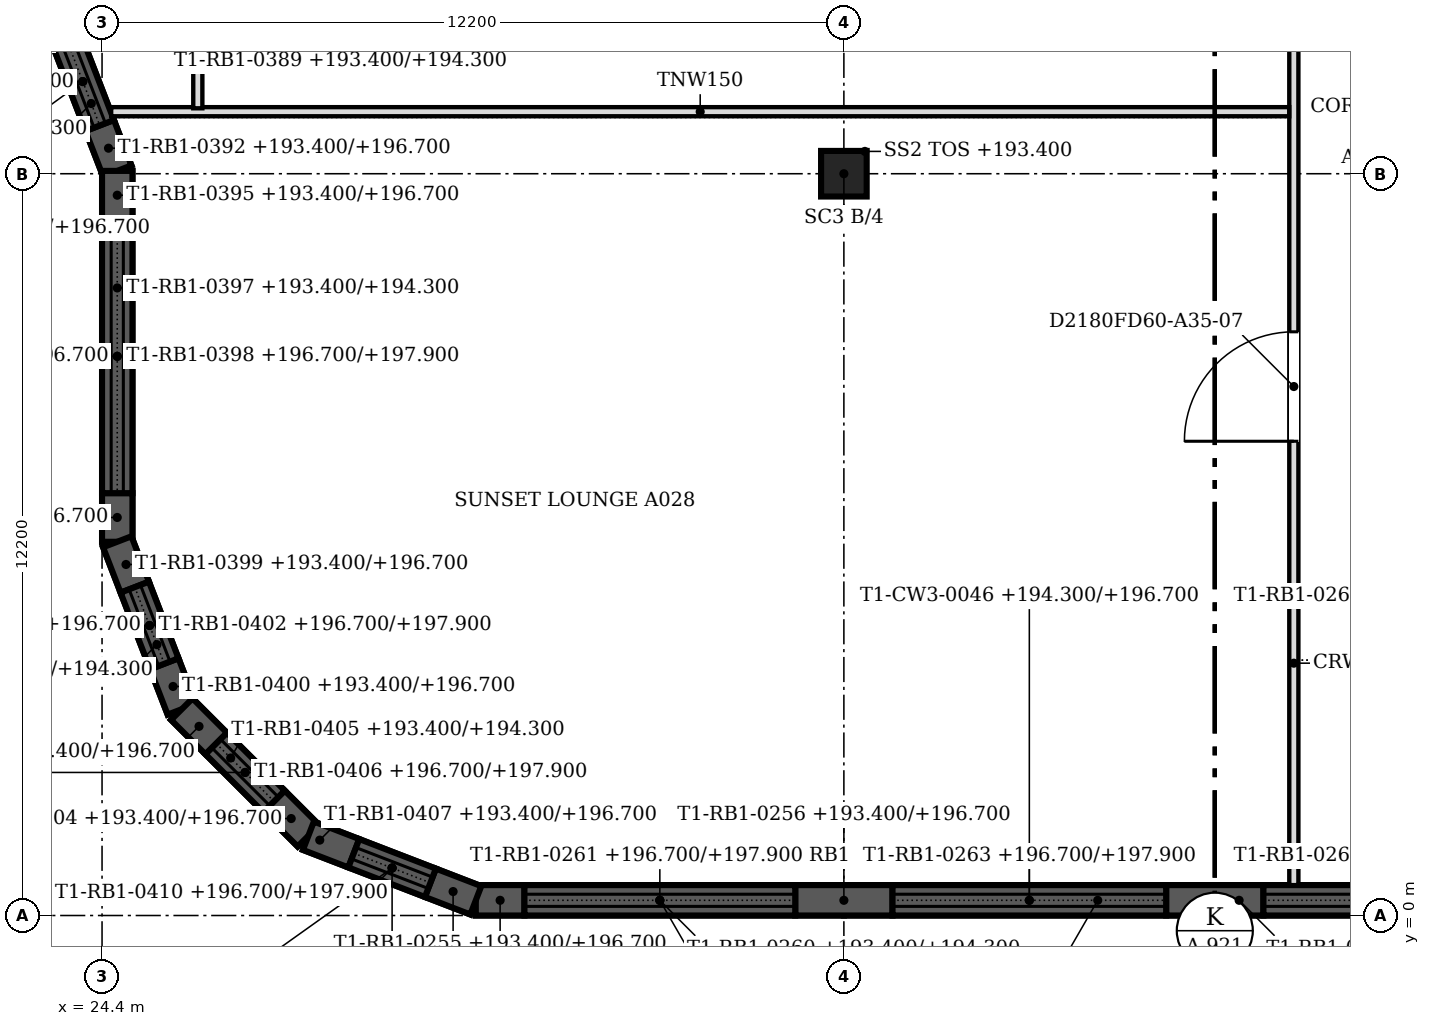
"""IFC4 building model, lengths in metres.
Left out: names, types, materials, properties, quantities, classifications, styles, units other than length and angle.
Written with IfcOpenShell. Run it as: python <this file> out.ifc"""

import sys

from ifc_helpers import new_model, si_unit, direction, frame, frame_2d, origin, origin_2d, place, context, subcontext, project, spatial, polyline, rectangle, outline, extrude, faceted_brep, source, transform, mapped, element, fill, save


model = new_model("IFC4")
c1 = context("Model", 3, precision=1e-05, world=origin(), true_north=direction((0.0, 1.0)))
c2 = subcontext(c1, "Body", "Model", "MODEL_VIEW")
j1 = project(units=[si_unit("LENGTHUNIT", "METRE"), si_unit("PLANEANGLEUNIT", "RADIAN")], contexts=[c1])
p1 = place(None, origin())
s1 = spatial("IfcSite", under=j1, at=p1, CompositionType="ELEMENT")
p2 = place(p1, origin())
s2 = spatial("IfcBuilding", under=s1, at=p2, CompositionType="ELEMENT")
p3 = place(p2, frame((0.0, 0.0, 193.4)))
s3 = spatial("IfcBuildingStorey", under=s2, at=p3, CompositionType="ELEMENT", Elevation=193.4)
p4 = place(p3, frame((36.6, 12.2, 0.0), z_axis=(0.0, 0.0, 1.0), x_axis=(1.0, 0.0, 0.0)))
e1 = element("IfcColumn", 1, at=p4, inside=s3, PredefinedType="COLUMN", context=c2, shape_type="SweptSolid", body=[
    extrude(rectangle(XDim=0.75, YDim=0.75, at=origin_2d()), origin(), (0.0, 0.0, 1.0), 4.3),
])
m1 = source(origin(), c2, "Body", "Brep", [
    faceted_brep([(0.0, -0.25, 0.0), (0.8, -0.25, 0.0), (0.8, -0.25, 3.3), (0.0, -0.25, 3.3), (0.047, 0.25, 3.3), (0.8, 0.25, 3.3), (0.8, 0.25, 0.0), (0.047, 0.25, 0.0), (0.0, 0.0, 0.0), (0.0, 0.0, 3.3)], [[[0, 1, 2, 3]], [[4, 5, 6, 7]], [[7, 6, 1, 0, 8]], [[5, 4, 9, 3, 2]], [[8, 0, 3, 9]], [[7, 8, 9, 4]], [[1, 6, 5, 2]]]),
])
p5 = place(p3, frame((30.547, 0.25, 0.0), z_axis=(0.0, 0.0, 1.0), x_axis=(1.0, 0.0, 0.0)))
e2 = element("IfcWall", 2, at=p5, inside=s3, PredefinedType="SOLIDWALL", context=c2, shape_type="MappedRepresentation", body=[
    mapped(m1, transform((0.0, 0.0, 0.0), scale=1.0)),
])
m2 = source(origin(), c2, "Body", "Brep", [
    faceted_brep([(0.0, -0.25, 0.0), (1.6, -0.25, 0.0), (1.6, -0.25, 3.3), (0.0, -0.25, 3.3), (0.0, 0.25, 3.3), (1.6, 0.25, 3.3), (1.6, 0.25, 0.0), (0.0, 0.25, 0.0)], [[[0, 1, 2, 3]], [[4, 5, 6, 7]], [[7, 6, 1, 0]], [[5, 4, 3, 2]], [[4, 7, 0, 3]], [[1, 6, 5, 2]]]),
])
p6 = place(p3, frame((35.8, 0.25, 0.0), z_axis=(0.0, 0.0, 1.0), x_axis=(1.0, 0.0, 0.0)))
e3 = element("IfcWall", 3, at=p6, inside=s3, PredefinedType="SOLIDWALL", context=c2, shape_type="MappedRepresentation", body=[
    mapped(m2, transform((0.0, 0.0, 0.0), scale=1.0)),
])
m3 = source(origin(), c2, "Body", "SweptSolid", [
    extrude(outline(polyline([(0.0, 0.0), (1.6, 0.0), (1.6, 3.3), (0.0, 3.3), (0.0, 0.0)])), frame((0.0, 0.25, 0.0), z_axis=(0.0, -1.0, 0.0), x_axis=(1.0, 0.0, 0.0)), (0.0, 0.0, 1.0), 0.5),
])
p7 = place(p3, frame((41.9, 0.25, 0.0), z_axis=(0.0, 0.0, 1.0), x_axis=(1.0, 0.0, 0.0)))
e4 = element("IfcWall", 4, at=p7, inside=s3, PredefinedType="SOLIDWALL", context=c2, shape_type="MappedRepresentation", body=[
    mapped(m3, transform((0.0, 0.0, 0.0), scale=1.0)),
])
m4 = source(origin(), c2, "Body", "SweptSolid", [
    extrude(outline(polyline([(0.0, 0.0), (4.453, 0.0), (4.453, 0.9), (0.0, 0.9), (0.0, 0.0)])), frame((0.0, 0.25, 0.0), z_axis=(0.0, -1.0, 0.0), x_axis=(1.0, 0.0, 0.0)), (0.0, 0.0, 1.0), 0.5),
])
p8 = place(p3, frame((31.346, 0.25, 0.0), z_axis=(0.0, 0.0, 1.0), x_axis=(1.0, 0.0, 0.0)))
e5 = element("IfcWall", 5, at=p8, inside=s3, PredefinedType="SOLIDWALL", context=c2, shape_type="MappedRepresentation", body=[
    mapped(m4, transform((0.0, 0.0, 0.0), scale=1.0)),
])
m5 = source(origin(), c2, "Body", "Brep", [
    faceted_brep([(0.0, -0.25, 0.0), (6.053, -0.25, 0.0), (6.053, -0.25, 1.2), (0.0, -0.25, 1.2), (0.047, 0.25, 1.2), (6.053, 0.25, 1.2), (6.053, 0.25, 0.0), (0.047, 0.25, 0.0), (0.0, 0.0, 0.0), (0.0, 0.0, 1.2)], [[[0, 1, 2, 3]], [[4, 5, 6, 7]], [[7, 6, 1, 0, 8]], [[5, 4, 9, 3, 2]], [[8, 0, 3, 9]], [[7, 8, 9, 4]], [[1, 6, 5, 2]]]),
])
p9 = place(p3, frame((30.547, 0.25, 3.3), z_axis=(0.0, 0.0, 1.0), x_axis=(1.0, 0.0, 0.0)))
e6 = element("IfcWall", 6, at=p9, inside=s3, PredefinedType="SOLIDWALL", context=c2, shape_type="MappedRepresentation", body=[
    mapped(m5, transform((0.0, 0.0, 0.0), scale=1.0)),
])
m6 = source(origin(), c2, "Body", "SweptSolid", [
    extrude(outline(polyline([(0.0, 0.0), (4.5, 0.0), (4.5, 0.9), (0.0, 0.9), (0.0, 0.0)])), frame((0.0, 0.25, 0.0), z_axis=(0.0, -1.0, 0.0), x_axis=(1.0, 0.0, 0.0)), (0.0, 0.0, 1.0), 0.5),
])
p10 = place(p3, frame((37.4, 0.25, 0.0), z_axis=(0.0, 0.0, 1.0), x_axis=(1.0, 0.0, 0.0)))
e7 = element("IfcWall", 7, at=p10, inside=s3, PredefinedType="SOLIDWALL", context=c2, shape_type="MappedRepresentation", body=[
    mapped(m6, transform((0.0, 0.0, 0.0), scale=1.0)),
])
m7 = source(origin(), c2, "Body", "Brep", [
    faceted_brep([(0.0, -0.25, 0.0), (6.1, -0.25, 0.0), (6.1, -0.25, 1.2), (0.0, -0.25, 1.2), (0.0, 0.25, 1.2), (6.1, 0.25, 1.2), (6.1, 0.25, 0.0), (0.0, 0.25, 0.0)], [[[0, 1, 2, 3]], [[4, 5, 6, 7]], [[7, 6, 1, 0]], [[5, 4, 3, 2]], [[4, 7, 0, 3]], [[1, 6, 5, 2]]]),
])
p11 = place(p3, frame((36.6, 0.25, 3.3), z_axis=(0.0, 0.0, 1.0), x_axis=(1.0, 0.0, 0.0)))
e8 = element("IfcWall", 8, at=p11, inside=s3, PredefinedType="SOLIDWALL", context=c2, shape_type="MappedRepresentation", body=[
    mapped(m7, transform((0.0, 0.0, 0.0), scale=1.0)),
])
p12 = place(p3, frame((43.5, 0.25, 0.0), z_axis=(0.0, 0.0, 1.0), x_axis=(1.0, 0.0, 0.0)))
e9 = element("IfcWall", 9, at=p12, inside=s3, PredefinedType="SOLIDWALL", context=c2, shape_type="MappedRepresentation", body=[
    mapped(m6, transform((0.0, 0.0, 0.0), scale=1.0)),
])
m8 = source(origin(), c2, "Body", "SweptSolid", [
    extrude(outline(polyline([(0.0, 0.0), (6.1, 0.0), (6.1, 1.2), (0.0, 1.2), (0.0, 0.0)])), frame((0.0, 0.25, 0.0), z_axis=(0.0, -1.0, 0.0), x_axis=(1.0, 0.0, 0.0)), (0.0, 0.0, 1.0), 0.5),
])
p13 = place(p3, frame((42.7, 0.25, 3.3), z_axis=(0.0, 0.0, 1.0), x_axis=(1.0, 0.0, 0.0)))
e10 = element("IfcWall", 10, at=p13, inside=s3, PredefinedType="SOLIDWALL", context=c2, shape_type="MappedRepresentation", body=[
    mapped(m8, transform((0.0, 0.0, 0.0), scale=1.0)),
])
m9 = source(origin(), c2, "Body", "Brep", [
    faceted_brep([(0.0, -0.25, 0.0), (0.753, -0.25, 0.0), (0.753, -0.25, 3.3), (0.0, -0.25, 3.3), (0.0, 0.25, 3.3), (0.8, 0.25, 3.3), (0.8, 0.25, 0.0), (0.0, 0.25, 0.0), (0.8, 0.0, 0.0), (0.8, 0.0, 3.3)], [[[0, 1, 2, 3]], [[4, 5, 6, 7]], [[7, 6, 8, 1, 0]], [[6, 5, 9, 8]], [[5, 4, 3, 2, 9]], [[4, 7, 0, 3]], [[1, 8, 9, 2]]]),
])
p14 = place(p3, frame((24.362, 12.993, 0.0), z_axis=(0.0, 0.0, 1.0), x_axis=(0.3598379092, -0.93301483327, 0.0)))
e11 = element("IfcWall", 11, at=p14, inside=s3, PredefinedType="SOLIDWALL", context=c2, shape_type="MappedRepresentation", body=[
    mapped(m9, transform((0.0, 0.0, 0.0), scale=1.0)),
])
m10 = source(origin(), c2, "Body", "Brep", [
    faceted_brep([(0.0, -0.25, 0.0), (1.549, -0.25, 0.0), (1.549, -0.25, 0.9), (0.0, -0.25, 0.9), (0.0, 0.25, 0.9), (1.549, 0.25, 0.9), (1.549, 0.25, 0.0), (0.0, 0.25, 0.0)], [[[0, 1, 2, 3]], [[4, 5, 6, 7]], [[7, 6, 1, 0]], [[5, 4, 3, 2]], [[4, 7, 0, 3]], [[1, 6, 5, 2]]]),
])
p15 = place(p3, frame((23.804, 14.438, 0.0), z_axis=(0.0, 0.0, 1.0), x_axis=(0.359897541845, -0.932991832426, 0.0)))
e12 = element("IfcWall", 12, at=p15, inside=s3, PredefinedType="SOLIDWALL", context=c2, shape_type="MappedRepresentation", body=[
    mapped(m10, transform((0.0, 0.0, 0.0), scale=1.0)),
])
m11 = source(origin(), c2, "Body", "Brep", [
    faceted_brep([(0.053, -0.25, 0.0), (3.103, -0.25, 0.0), (3.103, -0.25, 1.2), (0.053, -0.25, 1.2), (0.0, 0.25, 1.2), (3.149, 0.25, 1.2), (3.149, 0.25, 0.0), (0.0, 0.25, 0.0), (3.149, -0.0, 0.0), (0.0, 0.0, 0.0), (3.149, -0.0, 1.2), (0.0, 0.0, 1.2)], [[[0, 1, 2, 3]], [[4, 5, 6, 7]], [[7, 6, 8, 1, 0, 9]], [[6, 5, 10, 8]], [[5, 4, 11, 3, 2, 10]], [[4, 7, 9, 11]], [[9, 0, 3, 11]], [[1, 8, 10, 2]]]),
])
p16 = place(p3, frame((23.517, 15.185, 3.3), z_axis=(0.0, 0.0, 1.0), x_axis=(0.359841220347, -0.933013556246, 0.0)))
e13 = element("IfcWall", 13, at=p16, inside=s3, PredefinedType="SOLIDWALL", context=c2, shape_type="MappedRepresentation", body=[
    mapped(m11, transform((0.0, 0.0, 0.0), scale=1.0)),
])
m12 = source(origin(), c2, "Body", "Brep", [
    faceted_brep([(0.047, -0.25, 0.0), (0.8, -0.25, 0.0), (0.8, -0.25, 3.3), (0.047, -0.25, 3.3), (0.0, 0.25, 3.3), (0.8, 0.25, 3.3), (0.8, 0.25, 0.0), (0.0, 0.25, 0.0), (0.0, 0.0, 0.0), (0.0, 0.0, 3.3)], [[[0, 1, 2, 3]], [[4, 5, 6, 7]], [[7, 6, 1, 0, 8]], [[5, 4, 9, 3, 2]], [[4, 7, 8, 9]], [[8, 0, 3, 9]], [[1, 6, 5, 2]]]),
])
p17 = place(p3, frame((24.65, 12.247, 0.0), z_axis=(0.0, 0.0, 1.0), x_axis=(0.0, -1.0, 0.0)))
e14 = element("IfcWall", 14, at=p17, inside=s3, PredefinedType="SOLIDWALL", context=c2, shape_type="MappedRepresentation", body=[
    mapped(m12, transform((0.0, 0.0, 0.0), scale=1.0)),
])
m13 = source(origin(), c2, "Body", "Brep", [
    faceted_brep([(0.0, -0.25, 0.0), (0.8, -0.25, 0.0), (0.8, -0.25, 3.3), (0.0, -0.25, 3.3), (0.0, 0.25, 3.3), (0.753, 0.25, 3.3), (0.753, 0.25, 0.0), (0.0, 0.25, 0.0), (0.8, -0.0, 0.0), (0.8, -0.0, 3.3)], [[[0, 1, 2, 3]], [[4, 5, 6, 7]], [[7, 6, 8, 1, 0]], [[9, 2, 1, 8]], [[5, 4, 3, 2, 9]], [[4, 7, 0, 3]], [[8, 6, 5, 9]]]),
])
p18 = place(p3, frame((24.65, 6.947, 0.0), z_axis=(0.0, 0.0, 1.0), x_axis=(0.0, -1.0, 0.0)))
e15 = element("IfcWall", 15, at=p18, inside=s3, PredefinedType="SOLIDWALL", context=c2, shape_type="MappedRepresentation", body=[
    mapped(m13, transform((0.0, 0.0, 0.0), scale=1.0)),
])
p19 = place(p3, frame((24.65, 11.447, 0.0), z_axis=(0.0, 0.0, 1.0), x_axis=(0.0, -1.0, 0.0)))
e16 = element("IfcWall", 16, at=p19, inside=s3, PredefinedType="SOLIDWALL", context=c2, shape_type="MappedRepresentation", body=[
    mapped(m6, transform((0.0, 0.0, 0.0), scale=1.0)),
])
m14 = source(origin(), c2, "Body", "Brep", [
    faceted_brep([(0.047, -0.25, 0.0), (6.1, -0.25, 0.0), (6.1, -0.25, 1.2), (0.047, -0.25, 1.2), (0.0, 0.25, 1.2), (6.053, 0.25, 1.2), (6.053, 0.25, 0.0), (0.0, 0.25, 0.0), (6.1, -0.0, 0.0), (0.0, 0.0, 0.0), (6.1, -0.0, 1.2), (0.0, 0.0, 1.2)], [[[0, 1, 2, 3]], [[4, 5, 6, 7]], [[7, 6, 8, 1, 0, 9]], [[10, 2, 1, 8]], [[5, 4, 11, 3, 2, 10]], [[4, 7, 9, 11]], [[9, 0, 3, 11]], [[8, 6, 5, 10]]]),
])
p20 = place(p3, frame((24.65, 12.247, 3.3), z_axis=(0.0, 0.0, 1.0), x_axis=(0.0, -1.0, 0.0)))
e17 = element("IfcWall", 17, at=p20, inside=s3, PredefinedType="SOLIDWALL", context=c2, shape_type="MappedRepresentation", body=[
    mapped(m14, transform((0.0, 0.0, 0.0), scale=1.0)),
])
p21 = place(p3, frame((24.65, 6.146, 0.0), z_axis=(0.0, 0.0, 1.0), x_axis=(0.360103552367, -0.932912338632, 0.0)))
e18 = element("IfcWall", 18, at=p21, inside=s3, PredefinedType="SOLIDWALL", context=c2, shape_type="MappedRepresentation", body=[
    mapped(m1, transform((0.0, 0.0, 0.0), scale=1.0)),
])
m15 = source(origin(), c2, "Body", "Brep", [
    faceted_brep([(0.0, -0.25, 0.0), (0.8, -0.25, 0.0), (0.8, -0.25, 3.3), (0.0, -0.25, 3.3), (0.0, 0.25, 3.3), (0.747, 0.25, 3.3), (0.747, 0.25, 0.0), (0.0, 0.25, 0.0), (0.8, -0.0, 0.0), (0.8, -0.0, 3.3)], [[[0, 1, 2, 3]], [[4, 5, 6, 7]], [[7, 6, 8, 1, 0]], [[9, 2, 1, 8]], [[5, 4, 3, 2, 9]], [[4, 7, 0, 3]], [[8, 6, 5, 9]]]),
])
p22 = place(p3, frame((25.424, 4.14, 0.0), z_axis=(0.0, 0.0, 1.0), x_axis=(0.3598379092, -0.93301483327, 0.0)))
e19 = element("IfcWall", 19, at=p22, inside=s3, PredefinedType="SOLIDWALL", context=c2, shape_type="MappedRepresentation", body=[
    mapped(m15, transform((0.0, 0.0, 0.0), scale=1.0)),
])
m16 = source(origin(), c2, "Body", "SweptSolid", [
    extrude(outline(polyline([(0.0, 0.0), (1.351, 0.0), (1.351, 0.9), (0.0, 0.9), (0.0, 0.0)])), frame((0.0, 0.25, 0.0), z_axis=(0.0, -1.0, 0.0), x_axis=(1.0, 0.0, 0.0)), (0.0, 0.0, 1.0), 0.5),
])
p23 = place(p3, frame((24.938, 5.4, 0.0), z_axis=(0.0, 0.0, 1.0), x_axis=(0.359923772835, -0.932981713512, 0.0)))
e20 = element("IfcWall", 20, at=p23, inside=s3, PredefinedType="SOLIDWALL", context=c2, shape_type="MappedRepresentation", body=[
    mapped(m16, transform((0.0, 0.0, 0.0), scale=1.0)),
])
m17 = source(origin(), c2, "Body", "Brep", [
    faceted_brep([(0.0, -0.25, 0.0), (2.95, -0.25, 0.0), (2.95, -0.25, 1.2), (0.0, -0.25, 1.2), (0.047, 0.25, 1.2), (2.898, 0.25, 1.2), (2.898, 0.25, 0.0), (0.047, 0.25, 0.0), (2.95, 0.0, 0.0), (0.0, 0.0, 0.0), (2.95, 0.0, 1.2), (0.0, 0.0, 1.2)], [[[0, 1, 2, 3]], [[4, 5, 6, 7]], [[7, 6, 8, 1, 0, 9]], [[10, 2, 1, 8]], [[5, 4, 11, 3, 2, 10]], [[9, 0, 3, 11]], [[7, 9, 11, 4]], [[8, 6, 5, 10]]]),
])
p24 = place(p3, frame((24.65, 6.146, 3.3), z_axis=(0.0, 0.0, 1.0), x_axis=(0.359949242603, -0.932971887438, 0.0)))
e21 = element("IfcWall", 21, at=p24, inside=s3, PredefinedType="SOLIDWALL", context=c2, shape_type="MappedRepresentation", body=[
    mapped(m17, transform((0.0, 0.0, 0.0), scale=1.0)),
])
m18 = source(origin(), c2, "Body", "Brep", [
    faceted_brep([(0.0, -0.25, 0.0), (0.8, -0.25, 0.0), (0.8, -0.25, 3.3), (0.0, -0.25, 3.3), (0.053, 0.25, 3.3), (0.8, 0.25, 3.3), (0.8, 0.25, 0.0), (0.053, 0.25, 0.0), (0.0, 0.0, 0.0), (0.0, 0.0, 3.3)], [[[0, 1, 2, 3]], [[4, 5, 6, 7]], [[7, 6, 1, 0, 8]], [[5, 4, 9, 3, 2]], [[8, 0, 3, 9]], [[7, 8, 9, 4]], [[1, 6, 5, 2]]]),
])
p25 = place(p3, frame((25.712, 3.394, 0.0), z_axis=(0.0, 0.0, 1.0), x_axis=(0.707106781187, -0.707106781187, 0.0)))
e22 = element("IfcWall", 22, at=p25, inside=s3, PredefinedType="SOLIDWALL", context=c2, shape_type="MappedRepresentation", body=[
    mapped(m18, transform((0.0, 0.0, 0.0), scale=1.0)),
])
m19 = source(origin(), c2, "Body", "Brep", [
    faceted_brep([(0.0, -0.25, 0.0), (0.8, -0.25, 0.0), (0.8, -0.25, 3.3), (0.0, -0.25, 3.3), (0.0, 0.25, 3.3), (0.747, 0.25, 3.3), (0.747, 0.25, 0.0), (0.0, 0.25, 0.0), (0.8, -0.0, 0.0), (0.8, -0.0, 3.3)], [[[0, 1, 2, 3]], [[4, 5, 6, 7]], [[7, 6, 8, 1, 0]], [[9, 2, 1, 8]], [[5, 4, 3, 2, 9]], [[4, 7, 0, 3]], [[8, 6, 5, 9]]]),
])
p26 = place(p3, frame((27.228, 1.878, 0.0), z_axis=(0.0, 0.0, 1.0), x_axis=(0.706954206636, -0.707259322823, 0.0)))
e23 = element("IfcWall", 23, at=p26, inside=s3, PredefinedType="SOLIDWALL", context=c2, shape_type="MappedRepresentation", body=[
    mapped(m19, transform((0.0, 0.0, 0.0), scale=1.0)),
])
m20 = source(origin(), c2, "Body", "SweptSolid", [
    extrude(outline(polyline([(0.0, 0.0), (1.344, 0.0), (1.344, 0.9), (0.0, 0.9), (0.0, 0.0)])), frame((0.0, 0.25, 0.0), z_axis=(0.0, -1.0, 0.0), x_axis=(1.0, 0.0, 0.0)), (0.0, 0.0, 1.0), 0.5),
])
p27 = place(p3, frame((26.278, 2.828, 0.0), z_axis=(0.0, 0.0, 1.0), x_axis=(0.707106781187, -0.707106781187, 0.0)))
e24 = element("IfcWall", 24, at=p27, inside=s3, PredefinedType="SOLIDWALL", context=c2, shape_type="MappedRepresentation", body=[
    mapped(m20, transform((0.0, 0.0, 0.0), scale=1.0)),
])
m21 = source(origin(), c2, "Body", "Brep", [
    faceted_brep([(0.0, -0.25, 0.0), (2.944, -0.25, 0.0), (2.944, -0.25, 1.2), (0.0, -0.25, 1.2), (0.053, 0.25, 1.2), (2.891, 0.25, 1.2), (2.891, 0.25, 0.0), (0.053, 0.25, 0.0), (2.944, 0.0, 0.0), (0.0, 0.0, 0.0), (2.944, 0.0, 1.2), (0.0, 0.0, 1.2)], [[[0, 1, 2, 3]], [[4, 5, 6, 7]], [[7, 6, 8, 1, 0, 9]], [[10, 2, 1, 8]], [[5, 4, 11, 3, 2, 10]], [[9, 0, 3, 11]], [[7, 9, 11, 4]], [[8, 6, 5, 10]]]),
])
p28 = place(p3, frame((25.712, 3.394, 3.3), z_axis=(0.0, 0.0, 1.0), x_axis=(0.707106781187, -0.707106781187, 0.0)))
e25 = element("IfcWall", 25, at=p28, inside=s3, PredefinedType="SOLIDWALL", context=c2, shape_type="MappedRepresentation", body=[
    mapped(m21, transform((0.0, 0.0, 0.0), scale=1.0)),
])
m22 = source(origin(), c2, "Body", "Brep", [
    faceted_brep([(0.0, -0.25, 0.0), (0.8, -0.25, 0.0), (0.8, -0.25, 3.3), (0.0, -0.25, 3.3), (0.053, 0.25, 3.3), (0.8, 0.25, 3.3), (0.8, 0.25, 0.0), (0.053, 0.25, 0.0), (0.0, 0.0, 0.0), (0.0, 0.0, 3.3)], [[[0, 1, 2, 3]], [[4, 5, 6, 7]], [[7, 6, 1, 0, 8]], [[5, 4, 9, 3, 2]], [[8, 0, 3, 9]], [[7, 8, 9, 4]], [[1, 6, 5, 2]]]),
])
p29 = place(p3, frame((27.794, 1.312, 0.0), z_axis=(0.0, 0.0, 1.0), x_axis=(0.932951894851, -0.360001058183, 0.0)))
e26 = element("IfcWall", 26, at=p29, inside=s3, PredefinedType="SOLIDWALL", context=c2, shape_type="MappedRepresentation", body=[
    mapped(m22, transform((0.0, 0.0, 0.0), scale=1.0)),
])
p30 = place(p3, frame((29.8, 0.538, 0.0), z_axis=(0.0, 0.0, 1.0), x_axis=(0.933054335486, -0.359735468129, 0.0)))
e27 = element("IfcWall", 27, at=p30, inside=s3, PredefinedType="SOLIDWALL", context=c2, shape_type="MappedRepresentation", body=[
    mapped(m13, transform((0.0, 0.0, 0.0), scale=1.0)),
])
p31 = place(p3, frame((28.54, 1.024, 0.0), z_axis=(0.0, 0.0, 1.0), x_axis=(0.932981713512, -0.359923772835, 0.0)))
e28 = element("IfcWall", 28, at=p31, inside=s3, PredefinedType="SOLIDWALL", context=c2, shape_type="MappedRepresentation", body=[
    mapped(m16, transform((0.0, 0.0, 0.0), scale=1.0)),
])
m23 = source(origin(), c2, "Body", "Brep", [
    faceted_brep([(0.0, -0.25, 0.0), (2.95, -0.25, 0.0), (2.95, -0.25, 1.2), (0.0, -0.25, 1.2), (0.053, 0.25, 1.2), (2.904, 0.25, 1.2), (2.904, 0.25, 0.0), (0.053, 0.25, 0.0), (2.95, 0.0, 0.0), (0.0, 0.0, 0.0), (2.95, 0.0, 1.2), (0.0, 0.0, 1.2)], [[[0, 1, 2, 3]], [[4, 5, 6, 7]], [[7, 6, 8, 1, 0, 9]], [[10, 2, 1, 8]], [[5, 4, 11, 3, 2, 10]], [[9, 0, 3, 11]], [[7, 9, 11, 4]], [[8, 6, 5, 10]]]),
])
p32 = place(p3, frame((27.794, 1.312, 3.3), z_axis=(0.0, 0.0, 1.0), x_axis=(0.932971887438, -0.359949242603, 0.0)))
e29 = element("IfcWall", 29, at=p32, inside=s3, PredefinedType="SOLIDWALL", context=c2, shape_type="MappedRepresentation", body=[
    mapped(m23, transform((0.0, 0.0, 0.0), scale=1.0)),
])
p33 = place(p3, frame((44.0, 0.5, 0.0), z_axis=(0.0, 0.0, 1.0), x_axis=(0.0, 1.0, 0.0)))
e30 = element("IfcWall", 30, at=p33, inside=s3, PredefinedType="PARTITIONING", context=c2, shape_type="SweptSolid", body=[
    extrude(rectangle(XDim=21.424, YDim=0.15, at=frame_2d((10.712, 0.0))), origin(), (0.0, 0.0, 1.0), 3.767),
])
m24 = source(origin(), c2, "Body", "SweptSolid", [
    extrude(rectangle(XDim=1.8, YDim=2.1, at=frame_2d((0.9, 1.05))), frame((0.0, 0.085, 0.0), z_axis=(0.0, -1.0, 0.0), x_axis=(1.0, 0.0, 0.0)), (0.0, 0.0, 1.0), 0.17),
])
p34 = place(p33, frame((16.201, 0.0, 0.0)))
e31 = element("IfcOpeningElement", 31, at=p34, cuts=e30, PredefinedType="OPENING", context=c2, shape_type="MappedRepresentation", body=[
    mapped(m24, transform((0.0, 0.0, 0.0), scale=1.0)),
])
p35 = place(p33, frame((7.3, 0.0, 0.0)))
e32 = element("IfcOpeningElement", 32, at=p35, cuts=e30, PredefinedType="OPENING", context=c2, shape_type="MappedRepresentation", body=[
    mapped(m24, transform((0.0, 0.0, 0.0), scale=1.0)),
])
p36 = place(p3, frame((24.55, 13.22, 0.0), z_axis=(0.0, 0.0, 1.0), x_axis=(1.0, 0.0, 0.0)))
e33 = element("IfcWall", 33, at=p36, inside=s3, PredefinedType="PARTITIONING", context=c2, shape_type="SweptSolid", body=[
    extrude(rectangle(XDim=19.374, YDim=0.15, at=frame_2d((9.687, 0.0))), origin(), (0.0, 0.0, 1.0), 3.767),
])
p37 = place(p3, frame((25.975, 13.276, 0.0), z_axis=(0.0, 0.0, 1.0), x_axis=(0.0, 1.0, 0.0)))
e34 = element("IfcWall", 34, at=p37, inside=s3, PredefinedType="PARTITIONING", context=c2, shape_type="SweptSolid", body=[
    extrude(rectangle(XDim=5.524, YDim=0.15, at=frame_2d((2.762, 0.0))), origin(), (0.0, 0.0, 1.0), 3.767),
])
m25 = source(origin(), c2, "Body", "SweptSolid", [
    extrude(rectangle(XDim=0.9, YDim=2.1, at=frame_2d((0.45, 1.05))), frame((0.0, 0.085, 0.0), z_axis=(0.0, -1.0, 0.0), x_axis=(1.0, 0.0, 0.0)), (0.0, 0.0, 1.0), 0.17),
])
p38 = place(p37, frame((2.3, 0.0, 0.0)))
e35 = element("IfcOpeningElement", 35, at=p38, cuts=e34, PredefinedType="OPENING", context=c2, shape_type="MappedRepresentation", body=[
    mapped(m25, transform((0.0, 0.0, 0.0), scale=1.0)),
])
m26 = source(origin(), c2, "Body", "SweptSolid", [
    extrude(rectangle(XDim=1.8, YDim=2.1, at=frame_2d((0.9, 1.05))), frame((0.0, 0.025, 0.0), z_axis=(0.0, -1.0, 0.0), x_axis=(1.0, 0.0, 0.0)), (0.0, 0.0, 1.0), 0.05),
])
p39 = place(p35, origin())
e36 = element("IfcDoor", 36, at=p39, inside=s3, OperationType="DOUBLE_DOOR_SINGLE_SWING", PredefinedType="DOOR", context=c2, shape_type="MappedRepresentation", body=[
    mapped(m26, transform((0.0, 0.0, 0.0), scale=1.0)),
])
fill(e32, e36)
save(model, sys.argv[1])
